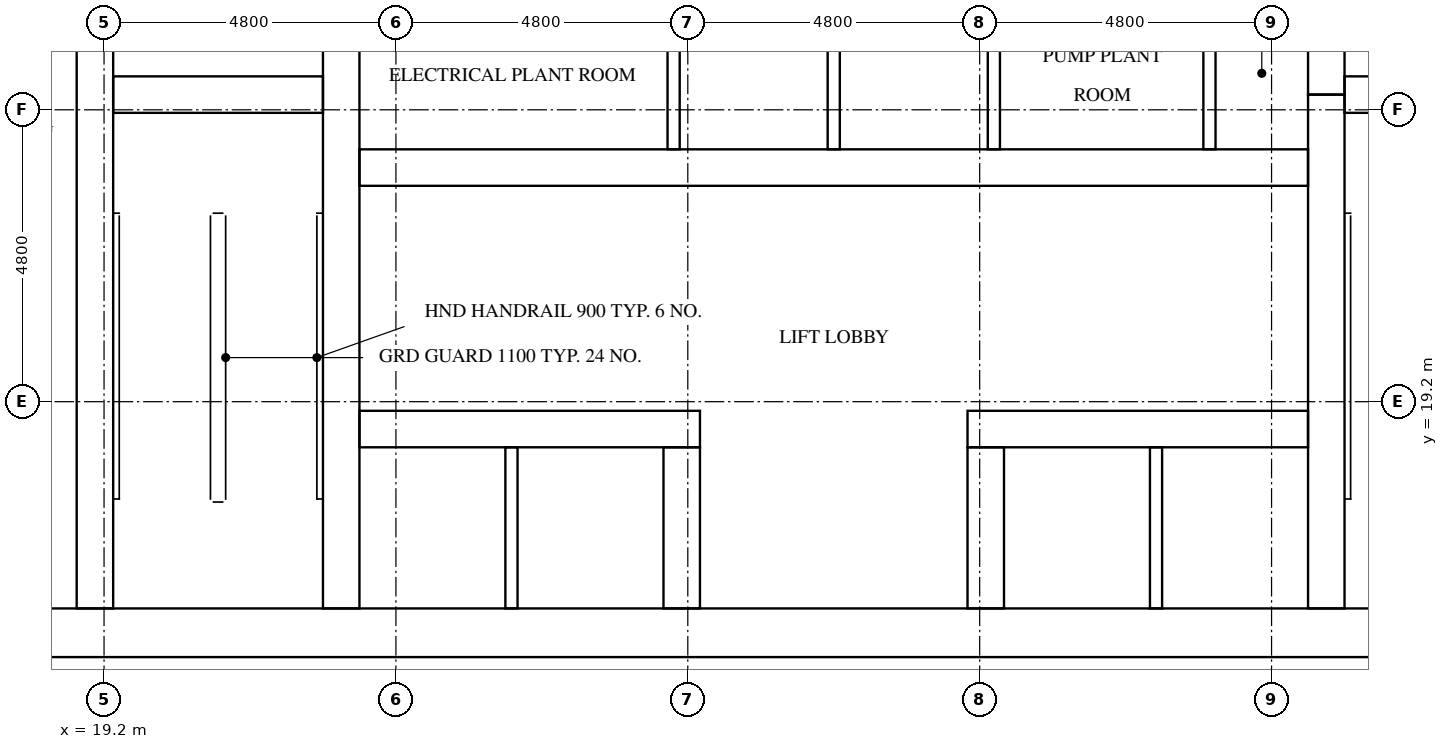
"""IFC4 building model, lengths in metres.
Left out: names, types, materials, properties, quantities, classifications, styles, units other than length and angle.
Written with IfcOpenShell. Run it as: python <this file> out.ifc"""

import sys

from ifc_helpers import new_model, si_unit, direction, frame, frame_2d, origin, place, context, subcontext, project, spatial, rectangle, extrude, element, fill, save


model = new_model("IFC4")
c1 = context("Model", 3, precision=1e-05, world=origin(), true_north=direction((0.0, 1.0)))
c2 = subcontext(c1, "Body", "Model", "MODEL_VIEW")
j1 = project(units=[si_unit("LENGTHUNIT", "METRE"), si_unit("PLANEANGLEUNIT", "RADIAN")], contexts=[c1])
p1 = place(None, origin())
s1 = spatial("IfcSite", under=j1, at=p1, CompositionType="ELEMENT")
p2 = place(p1, origin())
s2 = spatial("IfcBuilding", under=s1, at=p2, CompositionType="ELEMENT")
p3 = place(p2, frame((0.0, 0.0, 113.7)))
s3 = spatial("IfcBuildingStorey", under=s2, at=p3, CompositionType="ELEMENT", Elevation=113.7)
p4 = place(p3, frame((15.0, 15.4, 0.0), z_axis=(0.0, 0.0, 1.0), x_axis=(1.0, 0.0, 0.0)))
e1 = element("IfcWall", 1, at=p4, inside=s3, PredefinedType="SHEAR", context=c2, shape_type="SweptSolid", body=[
    extrude(rectangle(XDim=32.4, YDim=0.8, at=frame_2d((16.2, 0.0))), origin(), (0.0, 0.0, 1.0), 5.1),
])
p5 = place(p4, frame((15.3, 0.0, 0.0)))
e2 = element("IfcOpeningElement", 2, at=p5, cuts=e1, PredefinedType="OPENING", context=c2, shape_type="SweptSolid", body=[
    extrude(rectangle(XDim=1.8, YDim=2.1, at=frame_2d((0.9, 1.05))), frame((0.0, 0.41, 0.0), z_axis=(0.0, -1.0, 0.0), x_axis=(1.0, 0.0, 0.0)), (0.0, 0.0, 1.0), 0.82),
])
p6 = place(p3, frame((19.05, 15.8, 0.0), z_axis=(0.0, 0.0, 1.0), x_axis=(0.0, 1.0, 0.0)))
e3 = element("IfcWall", 3, at=p6, inside=s3, PredefinedType="SHEAR", context=c2, shape_type="SweptSolid", body=[
    extrude(rectangle(XDim=15.15, YDim=0.6, at=frame_2d((7.575, 0.0))), origin(), (0.0, 0.0, 1.0), 5.1),
])
p7 = place(p6, frame((9.65, 0.0, 0.0)))
e4 = element("IfcOpeningElement", 4, at=p7, cuts=e3, PredefinedType="OPENING", context=c2, shape_type="SweptSolid", body=[
    extrude(rectangle(XDim=1.1, YDim=2.1, at=frame_2d((0.55, 1.05))), frame((0.0, 0.31, 0.0), z_axis=(0.0, -1.0, 0.0), x_axis=(1.0, 0.0, 0.0)), (0.0, 0.0, 1.0), 0.62),
])
p8 = place(p6, frame((13.15, 0.0, 0.0)))
e5 = element("IfcOpeningElement", 5, at=p8, cuts=e3, PredefinedType="OPENING", context=c2, shape_type="SweptSolid", body=[
    extrude(rectangle(XDim=1.1, YDim=2.1, at=frame_2d((0.55, 1.05))), frame((0.0, 0.31, 0.0), z_axis=(0.0, -1.0, 0.0), x_axis=(1.0, 0.0, 0.0)), (0.0, 0.0, 1.0), 0.62),
])
p9 = place(p6, frame((0.4, 0.0, 0.0)))
e6 = element("IfcOpeningElement", 6, at=p9, cuts=e3, PredefinedType="OPENING", context=c2, shape_type="SweptSolid", body=[
    extrude(rectangle(XDim=1.2, YDim=2.1, at=frame_2d((0.6, 1.05))), frame((0.0, 0.31, 0.0), z_axis=(0.0, -1.0, 0.0), x_axis=(1.0, 0.0, 0.0)), (0.0, 0.0, 1.0), 0.62),
])
p10 = place(p3, frame((23.1, 15.8, 0.0), z_axis=(0.0, 0.0, 1.0), x_axis=(0.0, 1.0, 0.0)))
e7 = element("IfcWall", 7, at=p10, inside=s3, PredefinedType="SHEAR", context=c2, shape_type="SweptSolid", body=[
    extrude(rectangle(XDim=21.2, YDim=0.6, at=frame_2d((10.6, 0.0))), origin(), (0.0, 0.0, 1.0), 5.1),
])
p11 = place(p3, frame((39.3, 15.8, 0.0), z_axis=(0.0, 0.0, 1.0), x_axis=(0.0, 1.0, 0.0)))
e8 = element("IfcWall", 8, at=p11, inside=s3, PredefinedType="SHEAR", context=c2, shape_type="SweptSolid", body=[
    extrude(rectangle(XDim=8.45, YDim=0.6, at=frame_2d((4.225, 0.0))), origin(), (0.0, 0.0, 1.0), 5.1),
])
p12 = place(p3, frame((39.3, 24.25, 0.0), z_axis=(0.0, 0.0, 1.0), x_axis=(0.0, 1.0, 0.0)))
e9 = element("IfcWall", 9, at=p12, inside=s3, PredefinedType="SHEAR", context=c2, shape_type="SweptSolid", body=[
    extrude(rectangle(XDim=3.5, YDim=0.6, at=frame_2d((1.75, 0.0))), origin(), (0.0, 0.0, 1.0), 5.1),
])
for number, where, z_axis, x_axis in (
    (10, (19.35, 24.25, 0.0), (0.0, 0.0, 1.0), (1.0, 0.0, 0.0)),
    (11, (39.6, 24.25, 0.0), (0.0, 0.0, 1.0), (1.0, 0.0, 0.0)),
):
    element("IfcWall", number, at=place(p3, frame(where, z_axis=z_axis, x_axis=x_axis)), inside=s3, PredefinedType="SHEAR", context=c2, shape_type="SweptSolid", body=[
        extrude(rectangle(XDim=3.45, YDim=0.6, at=frame_2d((1.725, 0.0))), origin(), (0.0, 0.0, 1.0), 5.1),
    ])
p13 = place(p3, frame((23.4, 18.75, 0.0), z_axis=(0.0, 0.0, 1.0), x_axis=(1.0, 0.0, 0.0)))
e12 = element("IfcWall", 12, at=p13, inside=s3, PredefinedType="SHEAR", context=c2, shape_type="SweptSolid", body=[
    extrude(rectangle(XDim=5.6, YDim=0.6, at=frame_2d((2.8, 0.0))), origin(), (0.0, 0.0, 1.0), 5.1),
])
p14 = place(p13, frame((0.65, 0.0, 0.0)))
e13 = element("IfcOpeningElement", 13, at=p14, cuts=e12, PredefinedType="OPENING", context=c2, shape_type="SweptSolid", body=[
    extrude(rectangle(XDim=1.1, YDim=2.1, at=frame_2d((0.55, 1.05))), frame((0.0, 0.31, 0.0), z_axis=(0.0, -1.0, 0.0), x_axis=(1.0, 0.0, 0.0)), (0.0, 0.0, 1.0), 0.62),
])
p15 = place(p13, frame((3.25, 0.0, 0.0)))
e14 = element("IfcOpeningElement", 14, at=p15, cuts=e12, PredefinedType="OPENING", context=c2, shape_type="SweptSolid", body=[
    extrude(rectangle(XDim=1.1, YDim=2.1, at=frame_2d((0.55, 1.05))), frame((0.0, 0.31, 0.0), z_axis=(0.0, -1.0, 0.0), x_axis=(1.0, 0.0, 0.0)), (0.0, 0.0, 1.0), 0.62),
])
p16 = place(p3, frame((33.4, 18.75, 0.0), z_axis=(0.0, 0.0, 1.0), x_axis=(1.0, 0.0, 0.0)))
e15 = element("IfcWall", 15, at=p16, inside=s3, PredefinedType="SHEAR", context=c2, shape_type="SweptSolid", body=[
    extrude(rectangle(XDim=5.6, YDim=0.6, at=frame_2d((2.8, 0.0))), origin(), (0.0, 0.0, 1.0), 5.1),
])
p17 = place(p16, frame((1.25, 0.0, 0.0)))
e16 = element("IfcOpeningElement", 16, at=p17, cuts=e15, PredefinedType="OPENING", context=c2, shape_type="SweptSolid", body=[
    extrude(rectangle(XDim=1.1, YDim=2.1, at=frame_2d((0.55, 1.05))), frame((0.0, 0.31, 0.0), z_axis=(0.0, -1.0, 0.0), x_axis=(1.0, 0.0, 0.0)), (0.0, 0.0, 1.0), 0.62),
])
p18 = place(p16, frame((3.85, 0.0, 0.0)))
e17 = element("IfcOpeningElement", 17, at=p18, cuts=e15, PredefinedType="OPENING", context=c2, shape_type="SweptSolid", body=[
    extrude(rectangle(XDim=1.1, YDim=2.1, at=frame_2d((0.55, 1.05))), frame((0.0, 0.31, 0.0), z_axis=(0.0, -1.0, 0.0), x_axis=(1.0, 0.0, 0.0)), (0.0, 0.0, 1.0), 0.62),
])
p19 = place(p3, frame((23.4, 23.05, 0.0), z_axis=(0.0, 0.0, 1.0), x_axis=(1.0, 0.0, 0.0)))
e18 = element("IfcWall", 18, at=p19, inside=s3, PredefinedType="SHEAR", context=c2, shape_type="SweptSolid", body=[
    extrude(rectangle(XDim=15.6, YDim=0.6, at=frame_2d((7.8, 0.0))), origin(), (0.0, 0.0, 1.0), 5.1),
])
p20 = place(p19, frame((2.033, 0.0, 0.0)))
e19 = element("IfcOpeningElement", 19, at=p20, cuts=e18, PredefinedType="OPENING", context=c2, shape_type="SweptSolid", body=[
    extrude(rectangle(XDim=1.0, YDim=2.1, at=frame_2d((0.5, 1.05))), frame((0.0, 0.31, 0.0), z_axis=(0.0, -1.0, 0.0), x_axis=(1.0, 0.0, 0.0)), (0.0, 0.0, 1.0), 0.62),
])
p21 = place(p19, frame((11.706, 0.0, 0.0)))
e20 = element("IfcOpeningElement", 20, at=p21, cuts=e18, PredefinedType="OPENING", context=c2, shape_type="SweptSolid", body=[
    extrude(rectangle(XDim=1.0, YDim=2.1, at=frame_2d((0.5, 1.05))), frame((0.0, 0.31, 0.0), z_axis=(0.0, -1.0, 0.0), x_axis=(1.0, 0.0, 0.0)), (0.0, 0.0, 1.0), 0.62),
])
p22 = place(p19, frame((14.339, 0.0, 0.0)))
e21 = element("IfcOpeningElement", 21, at=p22, cuts=e18, PredefinedType="OPENING", context=c2, shape_type="SweptSolid", body=[
    extrude(rectangle(XDim=1.0, YDim=2.1, at=frame_2d((0.5, 1.05))), frame((0.0, 0.31, 0.0), z_axis=(0.0, -1.0, 0.0), x_axis=(1.0, 0.0, 0.0)), (0.0, 0.0, 1.0), 0.62),
])
for number, where, z_axis, x_axis in (
    (22, (28.7, 15.8, 0.0), (0.0, 0.0, 1.0), (0.0, 1.0, 0.0)),
    (23, (33.7, 15.8, 0.0), (0.0, 0.0, 1.0), (0.0, 1.0, 0.0)),
):
    element("IfcWall", number, at=place(p3, frame(where, z_axis=z_axis, x_axis=x_axis)), inside=s3, PredefinedType="SHEAR", context=c2, shape_type="SweptSolid", body=[
        extrude(rectangle(XDim=2.65, YDim=0.6, at=frame_2d((1.325, 0.0))), origin(), (0.0, 0.0, 1.0), 5.1),
    ])
for number, where, z_axis, x_axis in (
    (24, (28.567, 23.35, 0.0), (0.0, 0.0, 1.0), (0.0, 1.0, 0.0)),
    (25, (31.2, 23.35, 0.0), (0.0, 0.0, 1.0), (0.0, 1.0, 0.0)),
    (26, (33.833, 23.35, 0.0), (0.0, 0.0, 1.0), (0.0, 1.0, 0.0)),
):
    element("IfcWall", number, at=place(p3, frame(where, z_axis=z_axis, x_axis=x_axis)), inside=s3, PredefinedType="SOLIDWALL", context=c2, shape_type="SweptSolid", body=[
        extrude(rectangle(XDim=2.5, YDim=0.2, at=frame_2d((1.25, 0.0))), origin(), (0.0, 0.0, 1.0), 5.1),
    ])
for number, where, z_axis, x_axis in (
    (27, (25.9, 15.8, 0.0), (0.0, 0.0, 1.0), (0.0, 1.0, 0.0)),
    (28, (36.5, 15.8, 0.0), (0.0, 0.0, 1.0), (0.0, 1.0, 0.0)),
):
    element("IfcWall", number, at=place(p3, frame(where, z_axis=z_axis, x_axis=x_axis)), inside=s3, PredefinedType="SOLIDWALL", context=c2, shape_type="SweptSolid", body=[
        extrude(rectangle(XDim=2.65, YDim=0.2, at=frame_2d((1.325, 0.0))), origin(), (0.0, 0.0, 1.0), 5.1),
    ])
p23 = place(p3, frame((37.379, 23.35, 0.0), z_axis=(0.0, 0.0, 1.0), x_axis=(0.0, 1.0, 0.0)))
e29 = element("IfcWall", 29, at=p23, inside=s3, PredefinedType="PARTITIONING", context=c2, shape_type="SweptSolid", body=[
    extrude(rectangle(XDim=2.5, YDim=0.2, at=frame_2d((1.25, 0.0))), origin(), (0.0, 0.0, 1.0), 5.1),
])
p24 = place(p14, origin())
e30 = element("IfcDoor", 30, at=p24, inside=s3, OperationType="DOUBLE_DOOR_SLIDING", PredefinedType="DOOR", context=c2, shape_type="SweptSolid", body=[
    extrude(rectangle(XDim=1.1, YDim=2.1, at=frame_2d((0.55, 1.05))), frame((0.0, 0.025, 0.0), z_axis=(0.0, -1.0, 0.0), x_axis=(1.0, 0.0, 0.0)), (0.0, 0.0, 1.0), 0.05),
])
fill(e13, e30)
p25 = place(p15, origin())
e31 = element("IfcDoor", 31, at=p25, inside=s3, OperationType="DOUBLE_DOOR_SLIDING", PredefinedType="DOOR", context=c2, shape_type="SweptSolid", body=[
    extrude(rectangle(XDim=1.1, YDim=2.1, at=frame_2d((0.55, 1.05))), frame((0.0, 0.025, 0.0), z_axis=(0.0, -1.0, 0.0), x_axis=(1.0, 0.0, 0.0)), (0.0, 0.0, 1.0), 0.05),
])
fill(e14, e31)
p26 = place(p17, origin())
e32 = element("IfcDoor", 32, at=p26, inside=s3, OperationType="DOUBLE_DOOR_SLIDING", PredefinedType="DOOR", context=c2, shape_type="SweptSolid", body=[
    extrude(rectangle(XDim=1.1, YDim=2.1, at=frame_2d((0.55, 1.05))), frame((0.0, 0.025, 0.0), z_axis=(0.0, -1.0, 0.0), x_axis=(1.0, 0.0, 0.0)), (0.0, 0.0, 1.0), 0.05),
])
fill(e16, e32)
p27 = place(p18, origin())
e33 = element("IfcDoor", 33, at=p27, inside=s3, OperationType="DOUBLE_DOOR_SLIDING", PredefinedType="DOOR", context=c2, shape_type="SweptSolid", body=[
    extrude(rectangle(XDim=1.1, YDim=2.1, at=frame_2d((0.55, 1.05))), frame((0.0, 0.025, 0.0), z_axis=(0.0, -1.0, 0.0), x_axis=(1.0, 0.0, 0.0)), (0.0, 0.0, 1.0), 0.05),
])
fill(e17, e33)
p28 = place(p9, frame((1.2, 0.0, 0.0), z_axis=(0.0, 0.0, 1.0), x_axis=(-1.0, 0.0, 0.0)))
e34 = element("IfcDoor", 34, at=p28, inside=s3, OperationType="SINGLE_SWING_LEFT", PredefinedType="DOOR", context=c2, shape_type="SweptSolid", body=[
    extrude(rectangle(XDim=1.2, YDim=2.1, at=frame_2d((0.6, 1.05))), frame((0.0, 0.025, 0.0), z_axis=(0.0, -1.0, 0.0), x_axis=(1.0, 0.0, 0.0)), (0.0, 0.0, 1.0), 0.05),
])
fill(e6, e34)
p29 = place(p5, frame((1.8, 0.0, 0.0), z_axis=(0.0, 0.0, 1.0), x_axis=(-1.0, 0.0, 0.0)))
e35 = element("IfcDoor", 35, at=p29, inside=s3, OperationType="DOUBLE_DOOR_SINGLE_SWING", PredefinedType="DOOR", context=c2, shape_type="SweptSolid", body=[
    extrude(rectangle(XDim=1.8, YDim=2.1, at=frame_2d((0.9, 1.05))), frame((0.0, 0.025, 0.0), z_axis=(0.0, -1.0, 0.0), x_axis=(1.0, 0.0, 0.0)), (0.0, 0.0, 1.0), 0.05),
])
fill(e2, e35)
p30 = place(p20, frame((1.0, 0.0, 0.0), z_axis=(0.0, 0.0, 1.0), x_axis=(-1.0, 0.0, 0.0)))
e36 = element("IfcDoor", 36, at=p30, inside=s3, OperationType="SINGLE_SWING_RIGHT", PredefinedType="DOOR", context=c2, shape_type="SweptSolid", body=[
    extrude(rectangle(XDim=1.0, YDim=2.1, at=frame_2d((0.5, 1.05))), frame((0.0, 0.025, 0.0), z_axis=(0.0, -1.0, 0.0), x_axis=(1.0, 0.0, 0.0)), (0.0, 0.0, 1.0), 0.05),
])
fill(e19, e36)
p31 = place(p21, frame((1.0, 0.0, 0.0), z_axis=(0.0, 0.0, 1.0), x_axis=(-1.0, 0.0, 0.0)))
e37 = element("IfcDoor", 37, at=p31, inside=s3, OperationType="SINGLE_SWING_LEFT", PredefinedType="DOOR", context=c2, shape_type="SweptSolid", body=[
    extrude(rectangle(XDim=1.0, YDim=2.1, at=frame_2d((0.5, 1.05))), frame((0.0, 0.025, 0.0), z_axis=(0.0, -1.0, 0.0), x_axis=(1.0, 0.0, 0.0)), (0.0, 0.0, 1.0), 0.05),
])
fill(e20, e37)
p32 = place(p22, frame((1.0, 0.0, 0.0), z_axis=(0.0, 0.0, 1.0), x_axis=(-1.0, 0.0, 0.0)))
e38 = element("IfcDoor", 38, at=p32, inside=s3, OperationType="SINGLE_SWING_RIGHT", PredefinedType="DOOR", context=c2, shape_type="SweptSolid", body=[
    extrude(rectangle(XDim=1.0, YDim=2.1, at=frame_2d((0.5, 1.05))), frame((0.0, 0.025, 0.0), z_axis=(0.0, -1.0, 0.0), x_axis=(1.0, 0.0, 0.0)), (0.0, 0.0, 1.0), 0.05),
])
fill(e21, e38)
save(model, sys.argv[1])
